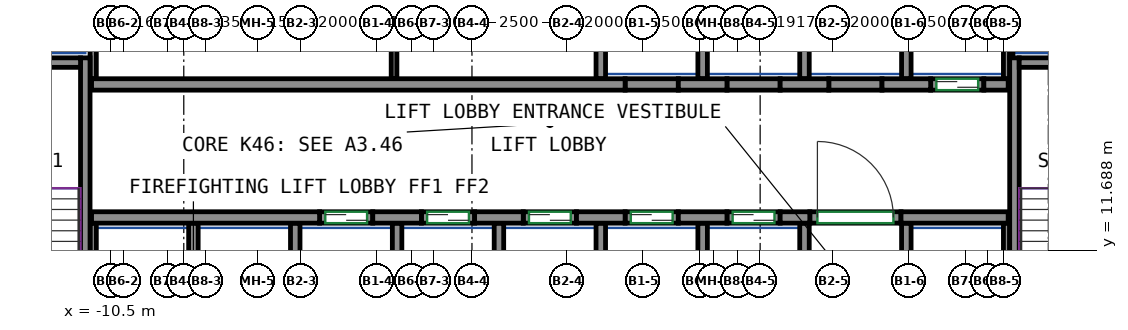
"""IFC4 building model, lengths in metres.
Left out: names, types, materials, properties, quantities, classifications, styles, units other than length and angle.
Written with IfcOpenShell. Run it as: python <this file> out.ifc"""

import sys

from ifc_helpers import new_model, si_unit, direction, frame, frame_2d, origin, place, context, subcontext, project, spatial, rectangle, extrude, source, transform, mapped, element, fill, save


model = new_model("IFC4")
c1 = context("Model", 3, precision=1e-05, world=origin(), true_north=direction((0.0, 1.0)))
c2 = subcontext(c1, "Body", "Model", "MODEL_VIEW")
j1 = project(units=[si_unit("LENGTHUNIT", "METRE"), si_unit("PLANEANGLEUNIT", "RADIAN")], contexts=[c1])
p1 = place(None, origin())
s1 = spatial("IfcSite", under=j1, at=p1, CompositionType="ELEMENT")
p2 = place(p1, origin())
s2 = spatial("IfcBuilding", under=s1, at=p2, CompositionType="ELEMENT")
p3 = place(p2, frame((0.0, 0.0, 188.9)))
s3 = spatial("IfcBuildingStorey", under=s2, at=p3, CompositionType="ELEMENT", Elevation=188.9)
m1 = source(origin(), c2, "Body", "SweptSolid", [
    extrude(rectangle(XDim=7.75, YDim=0.25, at=frame_2d((3.875, 0.0))), origin(), (0.0, 0.0, 1.0), 3.12),
])
p4 = place(p3, frame((-11.175, 9.0, 0.0), z_axis=(0.0, 0.0, 1.0), x_axis=(0.0, 1.0, 0.0)))
e1 = element("IfcWall", 1, at=p4, inside=s3, PredefinedType="SHEAR", context=c2, shape_type="MappedRepresentation", body=[
    mapped(m1, transform((0.0, 0.0, 0.0))),
])
m2 = source(origin(), c2, "Body", "SweptSolid", [
    extrude(rectangle(XDim=3.7, YDim=0.25, at=frame_2d((1.85, 0.0))), origin(), (0.0, 0.0, 1.0), 3.12),
])
p5 = place(p3, frame((-15.0, 16.625, 0.0), z_axis=(0.0, 0.0, 1.0), x_axis=(1.0, 0.0, 0.0)))
e2 = element("IfcWall", 2, at=p5, inside=s3, PredefinedType="SHEAR", context=c2, shape_type="MappedRepresentation", body=[
    mapped(m2, transform((0.0, 0.0, 0.0))),
])
p6 = place(p3, frame((13.275, 9.0, 0.0), z_axis=(0.0, 0.0, 1.0), x_axis=(0.0, 1.0, 0.0)))
e3 = element("IfcWall", 3, at=p6, inside=s3, PredefinedType="SHEAR", context=c2, shape_type="MappedRepresentation", body=[
    mapped(m1, transform((0.0, 0.0, 0.0))),
])
m3 = source(origin(), c2, "Body", "SweptSolid", [
    extrude(rectangle(XDim=3.7, YDim=0.25, at=frame_2d((1.85, 0.0))), origin(), (0.0, 0.0, 1.0), 3.12),
])
p7 = place(p3, frame((13.4, 16.625, 0.0), z_axis=(0.0, 0.0, 1.0), x_axis=(1.0, 0.0, 0.0)))
e4 = element("IfcWall", 4, at=p7, inside=s3, PredefinedType="SHEAR", context=c2, shape_type="MappedRepresentation", body=[
    mapped(m3, transform((0.0, 0.0, 0.0))),
])
m4 = source(origin(), c2, "Body", "SweptSolid", [
    extrude(rectangle(XDim=6.0, YDim=0.3, at=frame_2d((3.0, 0.0))), origin(), (0.0, 0.0, 1.0), 3.12),
])
p8 = place(p3, frame((-11.01, 12.55, 0.0), z_axis=(0.0, 0.0, 1.0), x_axis=(1.0, 0.0, 0.0)))
e5 = element("IfcWall", 5, at=p8, inside=s3, PredefinedType="SHEAR", context=c2, shape_type="MappedRepresentation", body=[
    mapped(m4, transform((0.0, 0.0, 0.0))),
])
m5 = source(origin(), c2, "Body", "SweptSolid", [
    extrude(rectangle(XDim=1.28, YDim=0.3, at=frame_2d((0.64, 0.0))), origin(), (0.0, 0.0, 1.0), 3.12),
])
for number, where, z_axis, x_axis in (
    (6, (-3.61, 12.55, 0.0), (0.0, 0.0, 1.0), (1.0, 0.0, 0.0)),
    (7, (-0.93, 12.55, 0.0), (0.0, 0.0, 1.0), (1.0, 0.0, 0.0)),
    (8, (1.75, 12.55, 0.0), (0.0, 0.0, 1.0), (1.0, 0.0, 0.0)),
    (9, (4.43, 12.55, 0.0), (0.0, 0.0, 1.0), (1.0, 0.0, 0.0)),
):
    element("IfcWall", number, at=place(p3, frame(where, z_axis=z_axis, x_axis=x_axis)), inside=s3, PredefinedType="SHEAR", context=c2, shape_type="MappedRepresentation", body=[
        mapped(m5, transform((0.0, 0.0, 0.0))),
    ])
m6 = source(origin(), c2, "Body", "SweptSolid", [
    extrude(rectangle(XDim=0.78, YDim=0.3, at=frame_2d((0.39, 0.0))), origin(), (0.0, 0.0, 1.0), 3.12),
])
p9 = place(p3, frame((7.11, 12.55, 0.0), z_axis=(0.0, 0.0, 1.0), x_axis=(1.0, 0.0, 0.0)))
e10 = element("IfcWall", 10, at=p9, inside=s3, PredefinedType="SHEAR", context=c2, shape_type="MappedRepresentation", body=[
    mapped(m6, transform((0.0, 0.0, 0.0))),
])
m7 = source(origin(), c2, "Body", "SweptSolid", [
    extrude(rectangle(XDim=2.82, YDim=0.3, at=frame_2d((1.41, 0.0))), origin(), (0.0, 0.0, 1.0), 3.12),
])
p10 = place(p3, frame((10.29, 12.55, 0.0), z_axis=(0.0, 0.0, 1.0), x_axis=(1.0, 0.0, 0.0)))
e11 = element("IfcWall", 11, at=p10, inside=s3, PredefinedType="SHEAR", context=c2, shape_type="MappedRepresentation", body=[
    mapped(m7, transform((0.0, 0.0, 0.0))),
])
m8 = source(origin(), c2, "Body", "SweptSolid", [
    extrude(rectangle(XDim=14.04, YDim=0.3, at=frame_2d((7.02, 0.0))), origin(), (0.0, 0.0, 1.0), 3.12),
])
p11 = place(p3, frame((-11.01, 16.05, 0.0), z_axis=(0.0, 0.0, 1.0), x_axis=(1.0, 0.0, 0.0)))
e12 = element("IfcWall", 12, at=p11, inside=s3, PredefinedType="SHEAR", context=c2, shape_type="MappedRepresentation", body=[
    mapped(m8, transform((0.0, 0.0, 0.0))),
])
p12 = place(p3, frame((4.43, 16.05, 0.0), z_axis=(0.0, 0.0, 1.0), x_axis=(1.0, 0.0, 0.0)))
e13 = element("IfcWall", 13, at=p12, inside=s3, PredefinedType="SHEAR", context=c2, shape_type="MappedRepresentation", body=[
    mapped(m5, transform((0.0, 0.0, 0.0))),
])
m9 = source(origin(), c2, "Body", "SweptSolid", [
    extrude(rectangle(XDim=1.28, YDim=0.3, at=frame_2d((0.64, 0.0))), origin(), (0.0, 0.0, 1.0), 3.12),
])
p13 = place(p3, frame((7.11, 16.05, 0.0), z_axis=(0.0, 0.0, 1.0), x_axis=(1.0, 0.0, 0.0)))
e14 = element("IfcWall", 14, at=p13, inside=s3, PredefinedType="SHEAR", context=c2, shape_type="MappedRepresentation", body=[
    mapped(m9, transform((0.0, 0.0, 0.0))),
])
p14 = place(p3, frame((9.79, 16.05, 0.0), z_axis=(0.0, 0.0, 1.0), x_axis=(1.0, 0.0, 0.0)))
e15 = element("IfcWall", 15, at=p14, inside=s3, PredefinedType="SHEAR", context=c2, shape_type="MappedRepresentation", body=[
    mapped(m5, transform((0.0, 0.0, 0.0))),
])
m10 = source(origin(), c2, "Body", "SweptSolid", [
    extrude(rectangle(XDim=0.64, YDim=0.3, at=frame_2d((0.32, 0.0))), origin(), (0.0, 0.0, 1.0), 3.12),
])
p15 = place(p3, frame((12.47, 16.05, 0.0), z_axis=(0.0, 0.0, 1.0), x_axis=(1.0, 0.0, 0.0)))
e16 = element("IfcWall", 16, at=p15, inside=s3, PredefinedType="SHEAR", context=c2, shape_type="MappedRepresentation", body=[
    mapped(m10, transform((0.0, 0.0, 0.0))),
])
m11 = source(origin(), c2, "Body", "SweptSolid", [
    extrude(rectangle(XDim=1.4, YDim=0.3, at=frame_2d((0.7, 0.0))), origin(), (0.0, 0.0, 1.0), 3.12),
])
p16 = place(p3, frame((-5.01, 12.55, 0.0), z_axis=(0.0, 0.0, 1.0), x_axis=(1.0, 0.0, 0.0)))
e17 = element("IfcWall", 17, at=p16, inside=s3, PredefinedType="PARTITIONING", context=c2, shape_type="MappedRepresentation", body=[
    mapped(m11, transform((0.0, 0.0, 0.0))),
])
p17 = place(p16, frame((0.15, 0.0, 0.0)))
e18 = element("IfcOpeningElement", 18, at=p17, cuts=e17, PredefinedType="OPENING", context=c2, shape_type="SweptSolid", body=[
    extrude(rectangle(XDim=1.1, YDim=2.1, at=frame_2d((0.55, 1.05))), frame((0.0, 0.16, 0.0), z_axis=(0.0, -1.0, 0.0), x_axis=(1.0, 0.0, 0.0)), (0.0, 0.0, 1.0), 0.32),
])
m12 = source(origin(), c2, "Body", "SweptSolid", [
    extrude(rectangle(XDim=1.4, YDim=0.3, at=frame_2d((0.7, 0.0))), origin(), (0.0, 0.0, 1.0), 3.12),
])
p18 = place(p3, frame((-2.33, 12.55, 0.0), z_axis=(0.0, 0.0, 1.0), x_axis=(1.0, 0.0, 0.0)))
e19 = element("IfcWall", 19, at=p18, inside=s3, PredefinedType="PARTITIONING", context=c2, shape_type="MappedRepresentation", body=[
    mapped(m12, transform((0.0, 0.0, 0.0))),
])
p19 = place(p18, frame((0.15, 0.0, 0.0)))
e20 = element("IfcOpeningElement", 20, at=p19, cuts=e19, PredefinedType="OPENING", context=c2, shape_type="SweptSolid", body=[
    extrude(rectangle(XDim=1.1, YDim=2.1, at=frame_2d((0.55, 1.05))), frame((0.0, 0.16, 0.0), z_axis=(0.0, -1.0, 0.0), x_axis=(1.0, 0.0, 0.0)), (0.0, 0.0, 1.0), 0.32),
])
p20 = place(p3, frame((0.35, 12.55, 0.0), z_axis=(0.0, 0.0, 1.0), x_axis=(1.0, 0.0, 0.0)))
e21 = element("IfcWall", 21, at=p20, inside=s3, PredefinedType="PARTITIONING", context=c2, shape_type="MappedRepresentation", body=[
    mapped(m11, transform((0.0, 0.0, 0.0))),
])
p21 = place(p20, frame((0.15, 0.0, 0.0)))
e22 = element("IfcOpeningElement", 22, at=p21, cuts=e21, PredefinedType="OPENING", context=c2, shape_type="SweptSolid", body=[
    extrude(rectangle(XDim=1.1, YDim=2.1, at=frame_2d((0.55, 1.05))), frame((0.0, 0.16, 0.0), z_axis=(0.0, -1.0, 0.0), x_axis=(1.0, 0.0, 0.0)), (0.0, 0.0, 1.0), 0.32),
])
p22 = place(p3, frame((3.03, 12.55, 0.0), z_axis=(0.0, 0.0, 1.0), x_axis=(1.0, 0.0, 0.0)))
e23 = element("IfcWall", 23, at=p22, inside=s3, PredefinedType="PARTITIONING", context=c2, shape_type="MappedRepresentation", body=[
    mapped(m11, transform((0.0, 0.0, 0.0))),
])
p23 = place(p22, frame((0.15, 0.0, 0.0)))
e24 = element("IfcOpeningElement", 24, at=p23, cuts=e23, PredefinedType="OPENING", context=c2, shape_type="SweptSolid", body=[
    extrude(rectangle(XDim=1.1, YDim=2.1, at=frame_2d((0.55, 1.05))), frame((0.0, 0.16, 0.0), z_axis=(0.0, -1.0, 0.0), x_axis=(1.0, 0.0, 0.0)), (0.0, 0.0, 1.0), 0.32),
])
p24 = place(p3, frame((5.71, 12.55, 0.0), z_axis=(0.0, 0.0, 1.0), x_axis=(1.0, 0.0, 0.0)))
e25 = element("IfcWall", 25, at=p24, inside=s3, PredefinedType="PARTITIONING", context=c2, shape_type="MappedRepresentation", body=[
    mapped(m12, transform((0.0, 0.0, 0.0))),
])
p25 = place(p24, frame((0.15, 0.0, 0.0)))
e26 = element("IfcOpeningElement", 26, at=p25, cuts=e25, PredefinedType="OPENING", context=c2, shape_type="SweptSolid", body=[
    extrude(rectangle(XDim=1.1, YDim=2.1, at=frame_2d((0.55, 1.05))), frame((0.0, 0.16, 0.0), z_axis=(0.0, -1.0, 0.0), x_axis=(1.0, 0.0, 0.0)), (0.0, 0.0, 1.0), 0.32),
])
p26 = place(p3, frame((11.07, 16.05, 0.0), z_axis=(0.0, 0.0, 1.0), x_axis=(1.0, 0.0, 0.0)))
e27 = element("IfcWall", 27, at=p26, inside=s3, PredefinedType="PARTITIONING", context=c2, shape_type="MappedRepresentation", body=[
    mapped(m11, transform((0.0, 0.0, 0.0))),
])
p27 = place(p26, frame((0.15, 0.0, 0.0)))
e28 = element("IfcOpeningElement", 28, at=p27, cuts=e27, PredefinedType="OPENING", context=c2, shape_type="SweptSolid", body=[
    extrude(rectangle(XDim=1.1, YDim=2.1, at=frame_2d((0.55, 1.05))), frame((0.0, 0.16, 0.0), z_axis=(0.0, -1.0, 0.0), x_axis=(1.0, 0.0, 0.0)), (0.0, 0.0, 1.0), 0.32),
])
m13 = source(origin(), c2, "Body", "SweptSolid", [
    extrude(rectangle(XDim=2.4, YDim=0.3, at=frame_2d((1.2, 0.0))), origin(), (0.0, 0.0, 1.0), 3.12),
])
p28 = place(p3, frame((7.89, 12.55, 0.0), z_axis=(0.0, 0.0, 1.0), x_axis=(1.0, 0.0, 0.0)))
e29 = element("IfcWall", 29, at=p28, inside=s3, PredefinedType="PARTITIONING", context=c2, shape_type="MappedRepresentation", body=[
    mapped(m13, transform((0.0, 0.0, 0.0))),
])
p29 = place(p28, frame((0.2, 0.0, 0.0)))
e30 = element("IfcOpeningElement", 30, at=p29, cuts=e29, PredefinedType="OPENING", context=c2, shape_type="SweptSolid", body=[
    extrude(rectangle(XDim=2.0, YDim=2.1, at=frame_2d((1.0, 1.05))), frame((0.0, 0.16, 0.0), z_axis=(0.0, -1.0, 0.0), x_axis=(1.0, 0.0, 0.0)), (0.0, 0.0, 1.0), 0.32),
])
p30 = place(p3, frame((3.03, 16.05, 0.0), z_axis=(0.0, 0.0, 1.0), x_axis=(1.0, 0.0, 0.0)))
e31 = element("IfcWall", 31, at=p30, inside=s3, PredefinedType="PARTITIONING", context=c2, shape_type="MappedRepresentation", body=[
    mapped(m11, transform((0.0, 0.0, 0.0))),
])
for number, where, z_axis, x_axis in (
    (32, (5.71, 16.05, 0.0), (0.0, 0.0, 1.0), (1.0, 0.0, 0.0)),
    (33, (8.39, 16.05, 0.0), (0.0, 0.0, 1.0), (1.0, 0.0, 0.0)),
):
    element("IfcWall", number, at=place(p3, frame(where, z_axis=z_axis, x_axis=x_axis)), inside=s3, PredefinedType="PARTITIONING", context=c2, shape_type="MappedRepresentation", body=[
        mapped(m12, transform((0.0, 0.0, 0.0))),
    ])
m14 = source(origin(), c2, "Body", "SweptSolid", [
    extrude(rectangle(XDim=3.275, YDim=0.165, at=frame_2d((1.638, 0.0))), origin(), (0.0, 0.0, 1.0), 3.12),
])
p31 = place(p3, frame((13.067, 16.2, 0.0), z_axis=(0.0, 0.0, 1.0), x_axis=(0.0, 1.0, 0.0)))
e34 = element("IfcWall", 34, at=p31, inside=s3, PredefinedType="PARTITIONING", context=c2, shape_type="MappedRepresentation", body=[
    mapped(m14, transform((0.0, 0.0, 0.0))),
])
m15 = source(origin(), c2, "Body", "SweptSolid", [
    extrude(rectangle(XDim=4.8, YDim=0.165, at=frame_2d((2.4, 0.0))), origin(), (0.0, 0.0, 1.0), 3.12),
])
p32 = place(p3, frame((-10.968, 16.2, 0.0), z_axis=(0.0, 0.0, 1.0), x_axis=(0.0, 1.0, 0.0)))
e35 = element("IfcWall", 35, at=p32, inside=s3, PredefinedType="PARTITIONING", context=c2, shape_type="MappedRepresentation", body=[
    mapped(m15, transform((0.0, 0.0, 0.0))),
])
m16 = source(origin(), c2, "Body", "SweptSolid", [
    extrude(rectangle(XDim=3.275, YDim=0.25, at=frame_2d((1.638, 0.0))), origin(), (0.0, 0.0, 1.0), 3.12),
])
p33 = place(p3, frame((10.43, 16.2, 0.0), z_axis=(0.0, 0.0, 1.0), x_axis=(0.0, 1.0, 0.0)))
e36 = element("IfcWall", 36, at=p33, inside=s3, PredefinedType="PARTITIONING", context=c2, shape_type="MappedRepresentation", body=[
    mapped(m16, transform((0.0, 0.0, 0.0))),
])
m17 = source(origin(), c2, "Body", "SweptSolid", [
    extrude(rectangle(XDim=2.725, YDim=0.085, at=frame_2d((1.363, 0.0))), origin(), (0.0, 0.0, 1.0), 3.12),
])
p34 = place(p3, frame((13.192, 16.75, 0.0), z_axis=(0.0, 0.0, 1.0), x_axis=(0.0, 1.0, 0.0)))
e37 = element("IfcWall", 37, at=p34, inside=s3, PredefinedType="PARTITIONING", context=c2, shape_type="MappedRepresentation", body=[
    mapped(m17, transform((0.0, 0.0, 0.0))),
])
for number, where, z_axis, x_axis in (
    (38, (2.39, 16.2, 0.0), (0.0, 0.0, 1.0), (0.0, 1.0, 0.0)),
    (39, (5.07, 16.2, 0.0), (0.0, 0.0, 1.0), (0.0, 1.0, 0.0)),
    (40, (7.75, 16.2, 0.0), (0.0, 0.0, 1.0), (0.0, 1.0, 0.0)),
):
    element("IfcWall", number, at=place(p3, frame(where, z_axis=z_axis, x_axis=x_axis)), inside=s3, PredefinedType="PARTITIONING", context=c2, shape_type="MappedRepresentation", body=[
        mapped(m16, transform((0.0, 0.0, 0.0))),
    ])
m18 = source(origin(), c2, "Body", "SweptSolid", [
    extrude(rectangle(XDim=3.4, YDim=0.25, at=frame_2d((1.7, 0.0))), origin(), (0.0, 0.0, 1.0), 3.12),
])
p35 = place(p3, frame((10.43, 9.0, 0.0), z_axis=(0.0, 0.0, 1.0), x_axis=(0.0, 1.0, 0.0)))
e41 = element("IfcWall", 41, at=p35, inside=s3, PredefinedType="PARTITIONING", context=c2, shape_type="MappedRepresentation", body=[
    mapped(m18, transform((0.0, 0.0, 0.0))),
])
m19 = source(origin(), c2, "Body", "SweptSolid", [
    extrude(rectangle(XDim=3.4, YDim=0.165, at=frame_2d((1.7, 0.0))), origin(), (0.0, 0.0, 1.0), 3.12),
])
p36 = place(p3, frame((13.067, 9.0, 0.0), z_axis=(0.0, 0.0, 1.0), x_axis=(0.0, 1.0, 0.0)))
e42 = element("IfcWall", 42, at=p36, inside=s3, PredefinedType="PARTITIONING", context=c2, shape_type="MappedRepresentation", body=[
    mapped(m19, transform((0.0, 0.0, 0.0))),
])
for number, where, z_axis, x_axis in (
    (43, (2.39, 9.0, 0.0), (0.0, 0.0, 1.0), (0.0, 1.0, 0.0)),
    (44, (5.07, 9.0, 0.0), (0.0, 0.0, 1.0), (0.0, 1.0, 0.0)),
    (45, (7.75, 9.0, 0.0), (0.0, 0.0, 1.0), (0.0, 1.0, 0.0)),
    (46, (-0.29, 9.0, 0.0), (0.0, 0.0, 1.0), (0.0, 1.0, 0.0)),
):
    element("IfcWall", number, at=place(p3, frame(where, z_axis=z_axis, x_axis=x_axis)), inside=s3, PredefinedType="PARTITIONING", context=c2, shape_type="MappedRepresentation", body=[
        mapped(m18, transform((0.0, 0.0, 0.0))),
    ])
p37 = place(p3, frame((-10.968, 9.0, 0.0), z_axis=(0.0, 0.0, 1.0), x_axis=(0.0, 1.0, 0.0)))
e47 = element("IfcWall", 47, at=p37, inside=s3, PredefinedType="PARTITIONING", context=c2, shape_type="MappedRepresentation", body=[
    mapped(m19, transform((0.0, 0.0, 0.0))),
])
for number, where, z_axis, x_axis in (
    (48, (-2.97, 9.0, 0.0), (0.0, 0.0, 1.0), (0.0, 1.0, 0.0)),
    (49, (-5.65, 9.0, 0.0), (0.0, 0.0, 1.0), (0.0, 1.0, 0.0)),
    (50, (-8.33, 9.0, 0.0), (0.0, 0.0, 1.0), (0.0, 1.0, 0.0)),
):
    element("IfcWall", number, at=place(p3, frame(where, z_axis=z_axis, x_axis=x_axis)), inside=s3, PredefinedType="PARTITIONING", context=c2, shape_type="MappedRepresentation", body=[
        mapped(m18, transform((0.0, 0.0, 0.0))),
    ])
m20 = source(origin(), c2, "Body", "SweptSolid", [
    extrude(rectangle(XDim=4.8, YDim=0.15, at=frame_2d((2.4, 0.0))), origin(), (0.0, 0.0, 1.0), 3.12),
])
p38 = place(p3, frame((-3.05, 16.2, 0.0), z_axis=(0.0, 0.0, 1.0), x_axis=(0.0, 1.0, 0.0)))
e51 = element("IfcWall", 51, at=p38, inside=s3, PredefinedType="PARTITIONING", context=c2, shape_type="MappedRepresentation", body=[
    mapped(m20, transform((0.0, 0.0, 0.0))),
])
p39 = place(p29, origin())
e52 = element("IfcDoor", 52, at=p39, inside=s3, OperationType="DOUBLE_DOOR_SINGLE_SWING", PredefinedType="DOOR", context=c2, shape_type="SweptSolid", body=[
    extrude(rectangle(XDim=2.0, YDim=2.1, at=frame_2d((1.0, 1.05))), frame((0.0, 0.025, 0.0), z_axis=(0.0, -1.0, 0.0), x_axis=(1.0, 0.0, 0.0)), (0.0, 0.0, 1.0), 0.05),
])
fill(e30, e52)
p40 = place(p17, origin())
e53 = element("IfcDoor", 53, at=p40, inside=s3, OperationType="DOUBLE_DOOR_SLIDING", PredefinedType="DOOR", context=c2, shape_type="SweptSolid", body=[
    extrude(rectangle(XDim=1.1, YDim=2.1, at=frame_2d((0.55, 1.05))), frame((0.0, 0.025, 0.0), z_axis=(0.0, -1.0, 0.0), x_axis=(1.0, 0.0, 0.0)), (0.0, 0.0, 1.0), 0.05),
])
fill(e18, e53)
p41 = place(p19, origin())
e54 = element("IfcDoor", 54, at=p41, inside=s3, OperationType="DOUBLE_DOOR_SLIDING", PredefinedType="DOOR", context=c2, shape_type="SweptSolid", body=[
    extrude(rectangle(XDim=1.1, YDim=2.1, at=frame_2d((0.55, 1.05))), frame((0.0, 0.025, 0.0), z_axis=(0.0, -1.0, 0.0), x_axis=(1.0, 0.0, 0.0)), (0.0, 0.0, 1.0), 0.05),
])
fill(e20, e54)
p42 = place(p21, origin())
e55 = element("IfcDoor", 55, at=p42, inside=s3, OperationType="DOUBLE_DOOR_SLIDING", PredefinedType="DOOR", context=c2, shape_type="SweptSolid", body=[
    extrude(rectangle(XDim=1.1, YDim=2.1, at=frame_2d((0.55, 1.05))), frame((0.0, 0.025, 0.0), z_axis=(0.0, -1.0, 0.0), x_axis=(1.0, 0.0, 0.0)), (0.0, 0.0, 1.0), 0.05),
])
fill(e22, e55)
p43 = place(p23, origin())
e56 = element("IfcDoor", 56, at=p43, inside=s3, OperationType="DOUBLE_DOOR_SLIDING", PredefinedType="DOOR", context=c2, shape_type="SweptSolid", body=[
    extrude(rectangle(XDim=1.1, YDim=2.1, at=frame_2d((0.55, 1.05))), frame((0.0, 0.025, 0.0), z_axis=(0.0, -1.0, 0.0), x_axis=(1.0, 0.0, 0.0)), (0.0, 0.0, 1.0), 0.05),
])
fill(e24, e56)
p44 = place(p25, origin())
e57 = element("IfcDoor", 57, at=p44, inside=s3, OperationType="DOUBLE_DOOR_SLIDING", PredefinedType="DOOR", context=c2, shape_type="SweptSolid", body=[
    extrude(rectangle(XDim=1.1, YDim=2.1, at=frame_2d((0.55, 1.05))), frame((0.0, 0.025, 0.0), z_axis=(0.0, -1.0, 0.0), x_axis=(1.0, 0.0, 0.0)), (0.0, 0.0, 1.0), 0.05),
])
fill(e26, e57)
p45 = place(p27, origin())
e58 = element("IfcDoor", 58, at=p45, inside=s3, OperationType="DOUBLE_DOOR_SLIDING", PredefinedType="DOOR", context=c2, shape_type="SweptSolid", body=[
    extrude(rectangle(XDim=1.1, YDim=2.1, at=frame_2d((0.55, 1.05))), frame((0.0, 0.025, 0.0), z_axis=(0.0, -1.0, 0.0), x_axis=(1.0, 0.0, 0.0)), (0.0, 0.0, 1.0), 0.05),
])
fill(e28, e58)
save(model, sys.argv[1])
